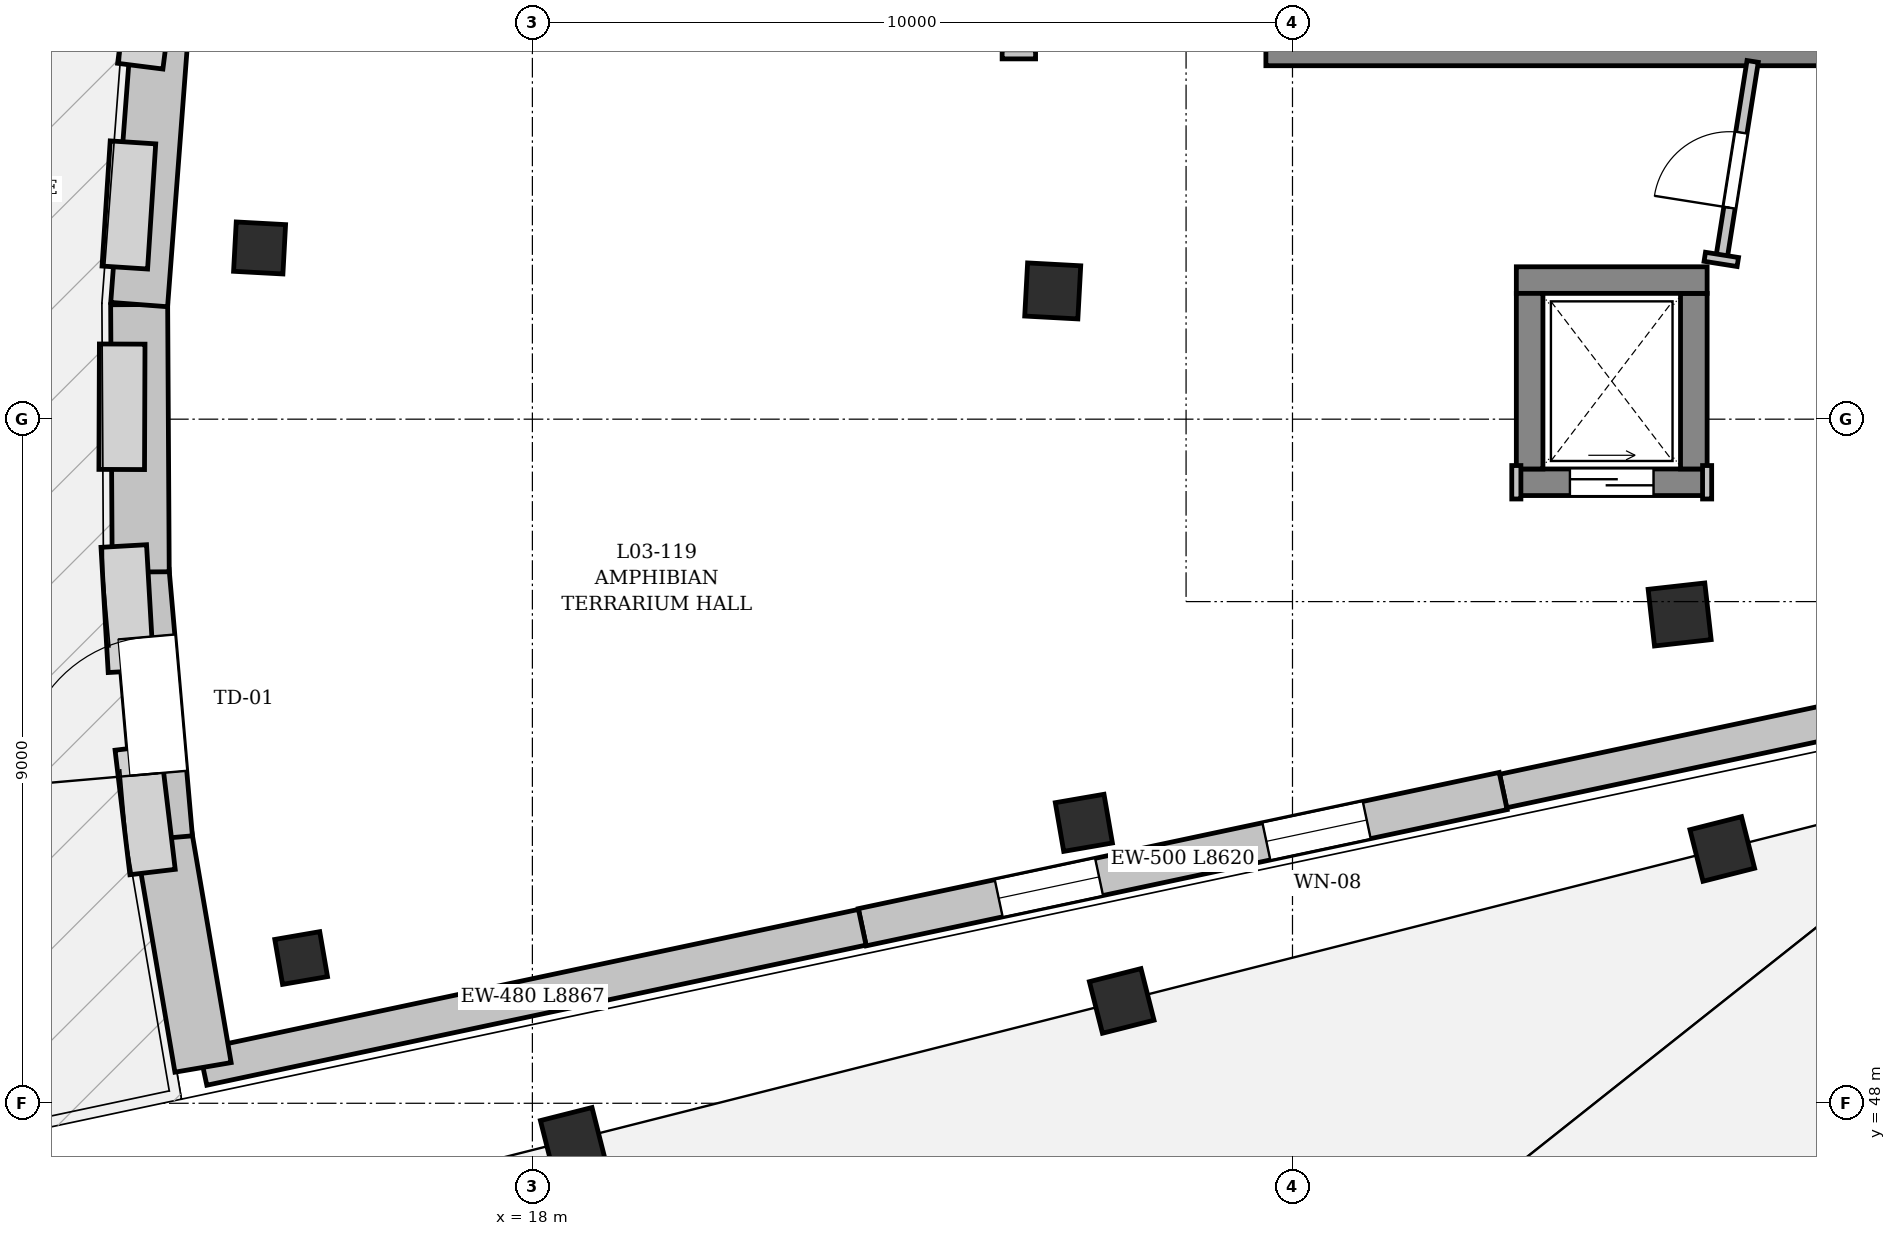
"""IFC4 building model, lengths in metres.
Left out: names, types, materials, properties, quantities, classifications, styles, units other than length and angle.
Written with IfcOpenShell. Run it as: python <this file> out.ifc"""

import sys

from ifc_helpers import new_model, si_unit, direction, frame, frame_2d, origin, origin_2d, place, context, subcontext, project, spatial, rectangle, extrude, element, fill, save


model = new_model("IFC4")
c1 = context("Model", 3, precision=1e-05, world=origin(), true_north=direction((0.0, 1.0)))
c2 = subcontext(c1, "Body", "Model", "MODEL_VIEW")
j1 = project(units=[si_unit("LENGTHUNIT", "METRE"), si_unit("PLANEANGLEUNIT", "RADIAN")], contexts=[c1])
p1 = place(None, origin())
s1 = spatial("IfcSite", under=j1, at=p1, CompositionType="ELEMENT")
p2 = place(p1, origin())
s2 = spatial("IfcBuilding", under=s1, at=p2, CompositionType="ELEMENT")
p3 = place(p2, frame((0.0, 0.0, 10.2)))
s3 = spatial("IfcBuildingStorey", under=s2, at=p3, CompositionType="ELEMENT", Elevation=10.2)
p4 = place(p3, frame((33.094, 54.431, 0.0), z_axis=(0.0, 0.0, 1.0), x_axis=(-0.993767919161, -0.111468932206, 0.0)))
e1 = element("IfcColumn", 1, at=p4, inside=s3, PredefinedType="COLUMN", context=c2, shape_type="SweptSolid", body=[
    extrude(rectangle(XDim=0.75, YDim=0.75, at=origin_2d()), origin(), (0.0, 0.0, 1.0), 4.58),
])
p5 = place(p3, frame((24.846, 58.687, 0.0), z_axis=(0.0, 0.0, 1.0), x_axis=(-0.998536670326, 0.054078812985, 0.0)))
e2 = element("IfcColumn", 2, at=p5, inside=s3, PredefinedType="COLUMN", context=c2, shape_type="SweptSolid", body=[
    extrude(rectangle(XDim=0.7, YDim=0.7, at=origin_2d()), origin(), (0.0, 0.0, 1.0), 4.58),
])
for number, where, z_axis, x_axis in (
    (3, (14.411, 59.252, 0.0), (0.0, 0.0, 1.0), (-0.999, 0.054, 0.0)),
    (4, (25.255, 51.689, 0.0), (0.0, 0.0, 1.0), (-0.985, -0.17, 0.0)),
):
    element("IfcColumn", number, at=place(p3, frame(where, z_axis=z_axis, x_axis=x_axis)), inside=s3, PredefinedType="COLUMN", context=c2, shape_type="SweptSolid", body=[
        extrude(rectangle(XDim=0.65, YDim=0.65, at=origin_2d()), origin(), (0.0, 0.0, 1.0), 4.58),
    ])
p6 = place(p3, frame((14.958, 49.911, 0.0), z_axis=(0.0, 0.0, 1.0), x_axis=(-0.985407898483, -0.170209499166, 0.0)))
e5 = element("IfcColumn", 5, at=p6, inside=s3, PredefinedType="COLUMN", context=c2, shape_type="SweptSolid", body=[
    extrude(rectangle(XDim=0.6, YDim=0.6, at=origin_2d()), origin(), (0.0, 0.0, 1.0), 4.58),
])
p7 = place(p3, frame((33.654, 51.346, -0.22), z_axis=(0.0, 0.0, 1.0), x_axis=(-0.969445349895, -0.245307385879, 0.0)))
e6 = element("IfcColumn", 6, at=p7, inside=s3, PredefinedType="COLUMN", context=c2, shape_type="SweptSolid", body=[
    extrude(rectangle(XDim=0.7, YDim=0.7, at=origin_2d()), origin(), (0.0, 0.0, 1.0), 0.851),
])
p8 = place(p3, frame((25.753, 49.346, -0.22), z_axis=(0.0, 0.0, 1.0), x_axis=(-0.969445349895, -0.245307385879, 0.0)))
e7 = element("IfcColumn", 7, at=p8, inside=s3, PredefinedType="COLUMN", context=c2, shape_type="SweptSolid", body=[
    extrude(rectangle(XDim=0.7, YDim=0.7, at=origin_2d()), origin(), (0.0, 0.0, 1.0), 1.757),
])
p9 = place(p3, frame((18.531, 47.519, -0.22), z_axis=(0.0, 0.0, 1.0), x_axis=(-0.969445349895, -0.245307385879, 0.0)))
e8 = element("IfcColumn", 8, at=p9, inside=s3, PredefinedType="COLUMN", context=c2, shape_type="SweptSolid", body=[
    extrude(rectangle(XDim=0.7, YDim=0.7, at=origin_2d()), origin(), (0.0, 0.0, 1.0), 2.584),
])
p10 = place(p2, frame((0.0, 0.0, 5.4)))
s4 = spatial("IfcBuildingStorey", under=s2, at=p10, CompositionType="ELEMENT", Elevation=5.4)
p11 = place(p10, frame((12.931, 47.375, 0.0), z_axis=(0.0, 0.0, 1.0), x_axis=(0.978149561412, 0.207902466336, 0.0)))
e9 = element("IfcWall", 9, at=p11, inside=s4, PredefinedType="SOLIDWALL", context=c2, shape_type="SweptSolid", body=[
    extrude(rectangle(XDim=10.488, YDim=0.5, at=frame_2d((5.244, 0.0))), origin(), (0.0, 0.0, 1.0), 6.765),
])
p12 = place(p11, frame((2.469, 0.0, 0.9)))
e10 = element("IfcOpeningElement", 10, at=p12, cuts=e9, PredefinedType="OPENING", context=c2, shape_type="SweptSolid", body=[
    extrude(rectangle(XDim=1.95, YDim=2.0, at=frame_2d((0.975, 1.0))), frame((0.0, 0.26, 0.0), z_axis=(0.0, -1.0, 0.0), x_axis=(1.0, 0.0, 0.0)), (0.0, 0.0, 1.0), 0.52),
])
p13 = place(p11, frame((6.069, 0.0, 0.9)))
e11 = element("IfcOpeningElement", 11, at=p13, cuts=e9, PredefinedType="OPENING", context=c2, shape_type="SweptSolid", body=[
    extrude(rectangle(XDim=1.95, YDim=2.0, at=frame_2d((0.975, 1.0))), frame((0.0, 0.26, 0.0), z_axis=(0.0, -1.0, 0.0), x_axis=(1.0, 0.0, 0.0)), (0.0, 0.0, 1.0), 0.52),
])
p14 = place(p3, frame((36.79, 53.387, 0.0), z_axis=(0.0, 0.0, 1.0), x_axis=(-0.978151790835, -0.207891976965, 0.0)))
e12 = element("IfcWall", 12, at=p14, inside=s3, PredefinedType="SOLIDWALL", context=c2, shape_type="SweptSolid", body=[
    extrude(rectangle(XDim=6.153, YDim=0.45, at=frame_2d((3.076, 0.0))), origin(), (0.0, 0.0, 1.0), 4.723),
])
p15 = place(p3, frame((30.772, 52.108, 0.0), z_axis=(0.0, 0.0, 1.0), x_axis=(-0.978147980705, -0.207909903187, 0.0)))
e13 = element("IfcWall", 13, at=p15, inside=s3, PredefinedType="SOLIDWALL", context=c2, shape_type="SweptSolid", body=[
    extrude(rectangle(XDim=8.62, YDim=0.5, at=frame_2d((4.31, 0.0))), origin(), (0.0, 0.0, 1.0), 5.932),
])
p16 = place(p15, frame((1.835, 0.0, 0.9)))
e14 = element("IfcOpeningElement", 14, at=p16, cuts=e13, PredefinedType="OPENING", context=c2, shape_type="SweptSolid", body=[
    extrude(rectangle(XDim=1.35, YDim=1.8, at=frame_2d((0.675, 0.9))), frame((0.0, 0.26, 0.0), z_axis=(0.0, -1.0, 0.0), x_axis=(1.0, 0.0, 0.0)), (0.0, 0.0, 1.0), 0.52),
])
p17 = place(p15, frame((5.435, 0.0, 0.9)))
e15 = element("IfcOpeningElement", 15, at=p17, cuts=e13, PredefinedType="OPENING", context=c2, shape_type="SweptSolid", body=[
    extrude(rectangle(XDim=1.35, YDim=1.8, at=frame_2d((0.675, 0.9))), frame((0.0, 0.26, 0.0), z_axis=(0.0, -1.0, 0.0), x_axis=(1.0, 0.0, 0.0)), (0.0, 0.0, 1.0), 0.52),
])
p18 = place(p3, frame((22.34, 50.316, 0.0), z_axis=(0.0, 0.0, 1.0), x_axis=(-0.97814681283, -0.207915397581, 0.0)))
e16 = element("IfcWall", 16, at=p18, inside=s3, PredefinedType="SOLIDWALL", context=c2, shape_type="SweptSolid", body=[
    extrude(rectangle(XDim=8.867, YDim=0.48, at=frame_2d((4.433, 0.0))), origin(), (0.0, 0.0, 1.0), 6.955),
])
p19 = place(p3, frame((13.667, 48.472, 0.0), z_axis=(0.0, 0.0, 1.0), x_axis=(-0.167946313116, 0.985796143181, 0.0)))
e17 = element("IfcWall", 17, at=p19, inside=s3, PredefinedType="SOLIDWALL", context=c2, shape_type="SweptSolid", body=[
    extrude(rectangle(XDim=3.057, YDim=0.75, at=frame_2d((1.529, 0.0))), origin(), (0.0, 0.0, 1.0), 4.723),
])
p20 = place(p3, frame((13.154, 51.486, 0.0), z_axis=(0.0, 0.0, 1.0), x_axis=(-0.087105819412, 0.996199064557, 0.0)))
e18 = element("IfcWall", 18, at=p20, inside=s3, PredefinedType="SOLIDWALL", context=c2, shape_type="SweptSolid", body=[
    extrude(rectangle(XDim=3.518, YDim=0.75, at=frame_2d((1.759, 0.0))), origin(), (0.0, 0.0, 1.0), 8.01),
])
p21 = place(p20, frame((0.859, 0.0, 0.0)))
e19 = element("IfcOpeningElement", 19, at=p21, cuts=e18, PredefinedType="OPENING", context=c2, shape_type="SweptSolid", body=[
    extrude(rectangle(XDim=1.8, YDim=2.4, at=frame_2d((0.9, 1.2))), frame((0.0, 0.385, 0.0), z_axis=(0.0, -1.0, 0.0), x_axis=(1.0, 0.0, 0.0)), (0.0, 0.0, 1.0), 0.77),
])
p22 = place(p3, frame((12.847, 54.99, 0.0), z_axis=(0.0, 0.0, 1.0), x_axis=(-0.005829590718, 0.999983007792, 0.0)))
e20 = element("IfcWall", 20, at=p22, inside=s3, PredefinedType="SOLIDWALL", context=c2, shape_type="SweptSolid", body=[
    extrude(rectangle(XDim=3.518, YDim=0.75, at=frame_2d((1.759, 0.0))), origin(), (0.0, 0.0, 1.0), 8.01),
])
p23 = place(p3, frame((12.827, 58.508, 0.0), z_axis=(0.0, 0.0, 1.0), x_axis=(0.075518108063, 0.997144430539, 0.0)))
e21 = element("IfcWall", 21, at=p23, inside=s3, PredefinedType="SOLIDWALL", context=c2, shape_type="SweptSolid", body=[
    extrude(rectangle(XDim=3.517, YDim=0.75, at=frame_2d((1.759, 0.0))), origin(), (0.0, 0.0, 1.0), 4.673),
])
p24 = place(p3, frame((27.65, 61.825, 0.0), z_axis=(0.0, 0.0, 1.0), x_axis=(1.0, 0.0, 0.0)))
e22 = element("IfcWall", 22, at=p24, inside=s3, PredefinedType="SHEAR", context=c2, shape_type="SweptSolid", body=[
    extrude(rectangle(XDim=9.1, YDim=0.35, at=frame_2d((4.55, 0.0))), origin(), (0.0, 0.0, 1.0), 3.6),
])
p25 = place(p3, frame((30.945, 56.17, 0.0), z_axis=(0.0, 0.0, 1.0), x_axis=(1.0, 0.0, 0.0)))
e23 = element("IfcWall", 23, at=p25, inside=s3, PredefinedType="SHEAR", context=c2, shape_type="SweptSolid", body=[
    extrude(rectangle(XDim=2.51, YDim=0.35, at=frame_2d((1.255, 0.0))), origin(), (0.0, 0.0, 1.0), 3.6),
])
p26 = place(p25, frame((0.705, 0.0, 0.0)))
e24 = element("IfcOpeningElement", 24, at=p26, cuts=e23, PredefinedType="OPENING", context=c2, shape_type="SweptSolid", body=[
    extrude(rectangle(XDim=1.1, YDim=2.2, at=frame_2d((0.55, 1.1))), frame((0.0, 0.185, 0.0), z_axis=(0.0, -1.0, 0.0), x_axis=(1.0, 0.0, 0.0)), (0.0, 0.0, 1.0), 0.37),
])
p27 = place(p3, frame((33.28, 56.345, 0.0), z_axis=(0.0, 0.0, 1.0), x_axis=(0.0, 1.0, 0.0)))
e25 = element("IfcWall", 25, at=p27, inside=s3, PredefinedType="SHEAR", context=c2, shape_type="SweptSolid", body=[
    extrude(rectangle(XDim=2.31, YDim=0.35, at=frame_2d((1.155, 0.0))), origin(), (0.0, 0.0, 1.0), 3.6),
])
p28 = place(p3, frame((33.455, 58.83, 0.0), z_axis=(0.0, 0.0, 1.0), x_axis=(-1.0, 0.0, 0.0)))
e26 = element("IfcWall", 26, at=p28, inside=s3, PredefinedType="SHEAR", context=c2, shape_type="SweptSolid", body=[
    extrude(rectangle(XDim=2.51, YDim=0.35, at=frame_2d((1.255, 0.0))), origin(), (0.0, 0.0, 1.0), 3.6),
])
p29 = place(p3, frame((31.12, 58.655, 0.0), z_axis=(0.0, 0.0, 1.0), x_axis=(0.0, -1.0, 0.0)))
e27 = element("IfcWall", 27, at=p29, inside=s3, PredefinedType="SHEAR", context=c2, shape_type="SweptSolid", body=[
    extrude(rectangle(XDim=2.31, YDim=0.35, at=frame_2d((1.155, 0.0))), origin(), (0.0, 0.0, 1.0), 3.6),
])
p30 = place(p3, frame((24.4, 65.5, 0.0), z_axis=(0.0, 0.0, 1.0), x_axis=(0.0, -1.0, 0.0)))
e28 = element("IfcWall", 28, at=p30, inside=s3, PredefinedType="PARTITIONING", context=c2, shape_type="SweptSolid", body=[
    extrude(rectangle(XDim=3.7, YDim=0.2, at=frame_2d((1.85, 0.0))), origin(), (0.0, 0.0, 1.0), 3.55),
])
p31 = place(p30, frame((1.593, 0.0, 0.0)))
e29 = element("IfcOpeningElement", 29, at=p31, cuts=e28, PredefinedType="OPENING", context=c2, shape_type="SweptSolid", body=[
    extrude(rectangle(XDim=1.25, YDim=2.2, at=frame_2d((0.625, 1.1))), frame((0.0, 0.11, 0.0), z_axis=(0.0, -1.0, 0.0), x_axis=(1.0, 0.0, 0.0)), (0.0, 0.0, 1.0), 0.22),
])
p32 = place(p3, frame((33.642, 59.102, 0.0), z_axis=(0.0, 0.0, 1.0), x_axis=(0.156466508954, 0.987683264805, 0.0)))
e30 = element("IfcWall", 30, at=p32, inside=s3, PredefinedType="PARTITIONING", context=c2, shape_type="SweptSolid", body=[
    extrude(rectangle(XDim=2.637, YDim=0.15, at=frame_2d((1.318, 0.0))), origin(), (0.0, 0.0, 1.0), 3.55),
])
p33 = place(p32, frame((0.689, 0.0, 0.0)))
e31 = element("IfcOpeningElement", 31, at=p33, cuts=e30, PredefinedType="OPENING", context=c2, shape_type="SweptSolid", body=[
    extrude(rectangle(XDim=1.0, YDim=2.2, at=frame_2d((0.5, 1.1))), frame((0.0, 0.085, 0.0), z_axis=(0.0, -1.0, 0.0), x_axis=(1.0, 0.0, 0.0)), (0.0, 0.0, 1.0), 0.17),
])
for number, where, z_axis, x_axis in (
    (32, (30.945, 55.95, 0.0), (0.0, 0.0, 1.0), (0.0, 1.0, 0.0)),
    (33, (33.455, 55.95, 0.0), (0.0, 0.0, 1.0), (0.0, 1.0, 0.0)),
):
    element("IfcWall", number, at=place(p3, frame(where, z_axis=z_axis, x_axis=x_axis)), inside=s3, PredefinedType="PARTITIONING", context=c2, shape_type="SweptSolid", body=[
        extrude(rectangle(XDim=0.44, YDim=0.12, at=frame_2d((0.22, 0.0))), origin(), (0.0, 0.0, 1.0), 3.55),
    ])
p34 = place(p3, frame((24.18, 61.8, 0.0), z_axis=(0.0, 0.0, 1.0), x_axis=(1.0, 0.0, 0.0)))
e34 = element("IfcWall", 34, at=p34, inside=s3, PredefinedType="PARTITIONING", context=c2, shape_type="SweptSolid", body=[
    extrude(rectangle(XDim=0.44, YDim=0.12, at=frame_2d((0.22, 0.0))), origin(), (0.0, 0.0, 1.0), 3.55),
])
p35 = place(p3, frame((33.859, 59.068, 0.0), z_axis=(0.0, 0.0, 1.0), x_axis=(-0.98768185006, 0.156475439167, 0.0)))
e35 = element("IfcWall", 35, at=p35, inside=s3, PredefinedType="PARTITIONING", context=c2, shape_type="SweptSolid", body=[
    extrude(rectangle(XDim=0.44, YDim=0.12, at=frame_2d((0.22, 0.0))), origin(), (0.0, 0.0, 1.0), 3.55),
])
p36 = place(p16, origin())
e36 = element("IfcWindow", 36, at=p36, inside=s3, PartitioningType="DOUBLE_PANEL_VERTICAL", PredefinedType="WINDOW", context=c2, shape_type="SweptSolid", body=[
    extrude(rectangle(XDim=1.35, YDim=1.8, at=frame_2d((0.675, 0.9))), frame((0.0, 0.03, 0.0), z_axis=(0.0, -1.0, 0.0), x_axis=(1.0, 0.0, 0.0)), (0.0, 0.0, 1.0), 0.06),
])
fill(e14, e36)
p37 = place(p17, origin())
e37 = element("IfcWindow", 37, at=p37, inside=s3, PartitioningType="DOUBLE_PANEL_VERTICAL", PredefinedType="WINDOW", context=c2, shape_type="SweptSolid", body=[
    extrude(rectangle(XDim=1.35, YDim=1.8, at=frame_2d((0.675, 0.9))), frame((0.0, 0.03, 0.0), z_axis=(0.0, -1.0, 0.0), x_axis=(1.0, 0.0, 0.0)), (0.0, 0.0, 1.0), 0.06),
])
fill(e15, e37)
p38 = place(p21, origin())
e38 = element("IfcDoor", 38, at=p38, inside=s3, OperationType="DOUBLE_DOOR_SINGLE_SWING", PredefinedType="DOOR", context=c2, shape_type="SweptSolid", body=[
    extrude(rectangle(XDim=1.8, YDim=2.4, at=frame_2d((0.9, 1.2))), frame((0.0, 0.025, 0.0), z_axis=(0.0, -1.0, 0.0), x_axis=(1.0, 0.0, 0.0)), (0.0, 0.0, 1.0), 0.05),
])
fill(e19, e38)
p39 = place(p26, origin())
e39 = element("IfcDoor", 39, at=p39, inside=s3, OperationType="SLIDING_TO_LEFT", PredefinedType="DOOR", context=c2, shape_type="SweptSolid", body=[
    extrude(rectangle(XDim=1.1, YDim=2.2, at=frame_2d((0.55, 1.1))), frame((0.0, 0.025, 0.0), z_axis=(0.0, -1.0, 0.0), x_axis=(1.0, 0.0, 0.0)), (0.0, 0.0, 1.0), 0.05),
])
fill(e24, e39)
p40 = place(p33, origin())
e40 = element("IfcDoor", 40, at=p40, inside=s3, OperationType="SINGLE_SWING_LEFT", PredefinedType="DOOR", context=c2, shape_type="SweptSolid", body=[
    extrude(rectangle(XDim=1.0, YDim=2.2, at=frame_2d((0.5, 1.1))), frame((0.0, 0.025, 0.0), z_axis=(0.0, -1.0, 0.0), x_axis=(1.0, 0.0, 0.0)), (0.0, 0.0, 1.0), 0.05),
])
fill(e31, e40)
save(model, sys.argv[1])
